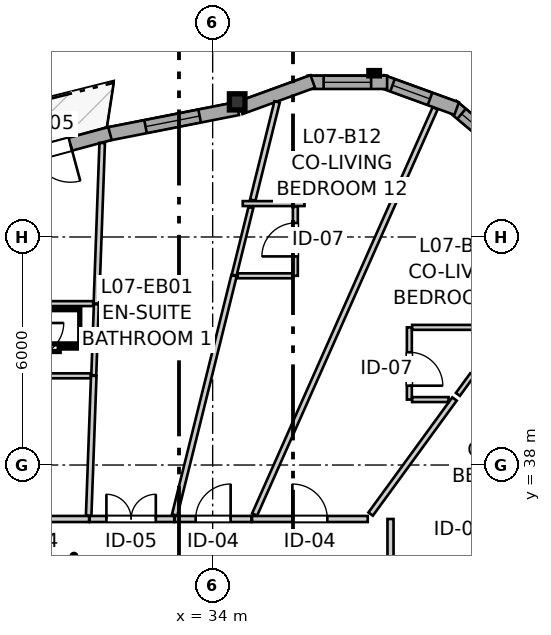
"""IFC4 building model, lengths in metres.
Left out: names, types, materials, properties, quantities, classifications, styles, units other than length and angle.
Written with IfcOpenShell. Run it as: python <this file> out.ifc"""

import sys

from ifc_helpers import new_model, si_unit, direction, frame, frame_2d, origin, origin_2d, place, context, subcontext, project, spatial, rectangle, i_section, extrude, source, transform, mapped, element, fill, save


model = new_model("IFC4")
c1 = context("Model", 3, precision=1e-05, world=origin(), true_north=direction((0.0, 1.0)))
c2 = subcontext(c1, "Body", "Model", "MODEL_VIEW")
j1 = project(units=[si_unit("LENGTHUNIT", "METRE"), si_unit("PLANEANGLEUNIT", "RADIAN")], contexts=[c1])
p1 = place(None, origin())
s1 = spatial("IfcSite", under=j1, at=p1, CompositionType="ELEMENT")
p2 = place(p1, origin())
s2 = spatial("IfcBuilding", under=s1, at=p2, CompositionType="ELEMENT")
p3 = place(p2, frame((0.0, 0.0, 27.0)))
s3 = spatial("IfcBuildingStorey", under=s2, at=p3, CompositionType="ELEMENT", Elevation=27.0)
m1 = source(origin(), c2, "Body", "SweptSolid", [
    extrude(i_section(OverallWidth=0.409, OverallDepth=0.425, WebThickness=0.03, FlangeThickness=0.048, FilletRadius=0.015, at=origin_2d()), origin(), (0.0, 0.0, 1.0), 2.935),
])
p4 = place(p3, frame((34.645, 47.555, 0.0), z_axis=(0.0, 0.0, 1.0), x_axis=(1.0, 0.0, 0.0)))
e1 = element("IfcColumn", 1, at=p4, inside=s3, PredefinedType="PILASTER", context=c2, shape_type="MappedRepresentation", body=[
    mapped(m1, transform((0.0, 0.0, 0.0), x_axis=(1.0, 0.0, 0.0), y_axis=(0.0, 1.0, 0.0), z_axis=(0.0, 0.0, 1.0), scale=1.0)),
])
p5 = place(p3, frame((41.905, 46.102, 0.0), z_axis=(0.0, 0.0, 1.0), x_axis=(-0.766024572719, 0.642811289563, 0.0)))
e2 = element("IfcWall", 2, at=p5, inside=s3, PredefinedType="SOLIDWALL", context=c2, shape_type="SweptSolid", body=[
    extrude(rectangle(XDim=2.09, YDim=0.35, at=frame_2d((1.045, 0.0))), origin(), (0.0, 0.0, 1.0), 2.415),
])
p6 = place(p5, frame((0.32, 0.0, 0.82)))
e3 = element("IfcOpeningElement", 3, at=p6, cuts=e2, PredefinedType="OPENING", context=c2, shape_type="SweptSolid", body=[
    extrude(rectangle(XDim=1.45, YDim=1.25, at=frame_2d((0.725, 0.625))), frame((0.0, 0.185, 0.0), z_axis=(0.0, -1.0, 0.0), x_axis=(1.0, 0.0, 0.0)), (0.0, 0.0, 1.0), 0.37),
])
p7 = place(p3, frame((40.421, 47.378, 0.0), z_axis=(0.0, 0.0, 1.0), x_axis=(-0.939711556618, 0.341968113072, 0.0)))
e4 = element("IfcWall", 4, at=p7, inside=s3, PredefinedType="SOLIDWALL", context=c2, shape_type="SweptSolid", body=[
    extrude(rectangle(XDim=2.09, YDim=0.35, at=frame_2d((1.045, 0.0))), origin(), (0.0, 0.0, 1.0), 2.415),
])
p8 = place(p7, frame((0.747, 0.0, 0.82)))
e5 = element("IfcOpeningElement", 5, at=p8, cuts=e4, PredefinedType="OPENING", context=c2, shape_type="SweptSolid", body=[
    extrude(rectangle(XDim=1.05, YDim=1.45, at=frame_2d((0.525, 0.725))), frame((0.0, 0.185, 0.0), z_axis=(0.0, -1.0, 0.0), x_axis=(1.0, 0.0, 0.0)), (0.0, 0.0, 1.0), 0.37),
])
p9 = place(p3, frame((38.59, 48.069, 0.0), z_axis=(0.0, 0.0, 1.0), x_axis=(-1.0, 0.0, 0.0)))
e6 = element("IfcWall", 6, at=p9, inside=s3, PredefinedType="SOLIDWALL", context=c2, shape_type="SweptSolid", body=[
    extrude(rectangle(XDim=2.09, YDim=0.35, at=frame_2d((1.045, 0.0))), origin(), (0.0, 0.0, 1.0), 2.415),
])
p10 = place(p9, frame((0.42, 0.0, 0.82)))
e7 = element("IfcOpeningElement", 7, at=p10, cuts=e6, PredefinedType="OPENING", context=c2, shape_type="SweptSolid", body=[
    extrude(rectangle(XDim=1.25, YDim=1.35, at=frame_2d((0.625, 0.675))), frame((0.0, 0.185, 0.0), z_axis=(0.0, -1.0, 0.0), x_axis=(1.0, 0.0, 0.0)), (0.0, 0.0, 1.0), 0.37),
])
p11 = place(p3, frame((36.633, 48.093, 0.0), z_axis=(0.0, 0.0, 1.0), x_axis=(-0.939691662178, -0.342022777067, 0.0)))
e8 = element("IfcWall", 8, at=p11, inside=s3, PredefinedType="SOLIDWALL", context=c2, shape_type="SweptSolid", body=[
    extrude(rectangle(XDim=2.032, YDim=0.35, at=frame_2d((1.016, 0.0))), origin(), (0.0, 0.0, 1.0), 2.415),
])
p12 = place(p3, frame((34.659, 47.38, 0.0), z_axis=(0.0, 0.0, 1.0), x_axis=(-0.981222284826, -0.19288034571, 0.0)))
e9 = element("IfcWall", 9, at=p12, inside=s3, PredefinedType="SOLIDWALL", context=c2, shape_type="SweptSolid", body=[
    extrude(rectangle(XDim=3.512, YDim=0.35, at=frame_2d((1.756, 0.0))), origin(), (0.0, 0.0, 1.0), 2.415),
])
p13 = place(p12, frame((1.021, 0.0, 0.82)))
e10 = element("IfcOpeningElement", 10, at=p13, cuts=e9, PredefinedType="OPENING", context=c2, shape_type="SweptSolid", body=[
    extrude(rectangle(XDim=1.45, YDim=1.25, at=frame_2d((0.725, 0.625))), frame((0.0, 0.185, 0.0), z_axis=(0.0, -1.0, 0.0), x_axis=(1.0, 0.0, 0.0)), (0.0, 0.0, 1.0), 0.37),
])
p14 = place(p3, frame((31.298, 46.722, 0.0), z_axis=(0.0, 0.0, 1.0), x_axis=(-0.965455913242, -0.260566459057, 0.0)))
e11 = element("IfcWall", 11, at=p14, inside=s3, PredefinedType="SOLIDWALL", context=c2, shape_type="SweptSolid", body=[
    extrude(rectangle(XDim=3.159, YDim=0.35, at=frame_2d((1.58, 0.0))), origin(), (0.0, 0.0, 1.0), 2.415),
])
p15 = place(p14, frame((1.08, 0.0, 0.0)))
e12 = element("IfcOpeningElement", 12, at=p15, cuts=e11, PredefinedType="OPENING", context=c2, shape_type="SweptSolid", body=[
    extrude(rectangle(XDim=1.0, YDim=2.1, at=frame_2d((0.5, 1.05))), frame((0.0, 0.185, 0.0), z_axis=(0.0, -1.0, 0.0), x_axis=(1.0, 0.0, 0.0)), (0.0, 0.0, 1.0), 0.37),
])
p16 = place(p3, frame((38.68, 36.58, 0.0), z_axis=(0.0, 0.0, 1.0), x_axis=(0.0, -1.0, 0.0)))
e13 = element("IfcWall", 13, at=p16, inside=s3, PredefinedType="PARTITIONING", context=c2, shape_type="SweptSolid", body=[
    extrude(rectangle(XDim=4.39, YDim=0.16, at=frame_2d((2.195, 0.0))), origin(), (0.0, 0.0, 1.0), 2.935),
])
p17 = place(p16, frame((1.726, 0.0, 0.0)))
e14 = element("IfcOpeningElement", 14, at=p17, cuts=e13, PredefinedType="OPENING", context=c2, shape_type="SweptSolid", body=[
    extrude(rectangle(XDim=0.92, YDim=2.1, at=frame_2d((0.46, 1.05))), frame((0.0, 0.09, 0.0), z_axis=(0.0, -1.0, 0.0), x_axis=(1.0, 0.0, 0.0)), (0.0, 0.0, 1.0), 0.18),
])
p18 = place(p3, frame((35.036, 36.58, 0.0), z_axis=(0.0, 0.0, 1.0), x_axis=(1.0, 0.0, 0.0)))
e15 = element("IfcWall", 15, at=p18, inside=s3, PredefinedType="PARTITIONING", context=c2, shape_type="SweptSolid", body=[
    extrude(rectangle(XDim=3.045, YDim=0.16, at=frame_2d((1.522, 0.0))), origin(), (0.0, 0.0, 1.0), 2.935),
])
p19 = place(p18, frame((1.062, 0.0, 0.0)))
e16 = element("IfcOpeningElement", 16, at=p19, cuts=e15, PredefinedType="OPENING", context=c2, shape_type="SweptSolid", body=[
    extrude(rectangle(XDim=0.92, YDim=2.1, at=frame_2d((0.46, 1.05))), frame((0.0, 0.09, 0.0), z_axis=(0.0, -1.0, 0.0), x_axis=(1.0, 0.0, 0.0)), (0.0, 0.0, 1.0), 0.18),
])
p20 = place(p3, frame((27.846, 36.58, 0.0), z_axis=(0.0, 0.0, 1.0), x_axis=(1.0, 0.0, 0.0)))
e17 = element("IfcWall", 17, at=p20, inside=s3, PredefinedType="PARTITIONING", context=c2, shape_type="SweptSolid", body=[
    extrude(rectangle(XDim=2.903, YDim=0.16, at=frame_2d((1.452, 0.0))), origin(), (0.0, 0.0, 1.0), 2.935),
])
p21 = place(p20, frame((0.969, 0.0, 0.0)))
e18 = element("IfcOpeningElement", 18, at=p21, cuts=e17, PredefinedType="OPENING", context=c2, shape_type="SweptSolid", body=[
    extrude(rectangle(XDim=0.92, YDim=2.1, at=frame_2d((0.46, 1.05))), frame((0.0, 0.09, 0.0), z_axis=(0.0, -1.0, 0.0), x_axis=(1.0, 0.0, 0.0)), (0.0, 0.0, 1.0), 0.18),
])
p22 = place(p3, frame((30.764, 36.58, 0.0), z_axis=(0.0, 0.0, 1.0), x_axis=(1.0, 0.0, 0.0)))
e19 = element("IfcWall", 19, at=p22, inside=s3, PredefinedType="PARTITIONING", context=c2, shape_type="SweptSolid", body=[
    extrude(rectangle(XDim=2.225, YDim=0.16, at=frame_2d((1.113, 0.0))), origin(), (0.0, 0.0, 1.0), 2.935),
])
p23 = place(p22, frame((0.44, 0.0, 0.0)))
e20 = element("IfcOpeningElement", 20, at=p23, cuts=e19, PredefinedType="OPENING", context=c2, shape_type="SweptSolid", body=[
    extrude(rectangle(XDim=1.3, YDim=2.1, at=frame_2d((0.65, 1.05))), frame((0.0, 0.09, 0.0), z_axis=(0.0, -1.0, 0.0), x_axis=(1.0, 0.0, 0.0)), (0.0, 0.0, 1.0), 0.18),
])
p24 = place(p3, frame((33.004, 36.58, 0.0), z_axis=(0.0, 0.0, 1.0), x_axis=(1.0, 0.0, 0.0)))
e21 = element("IfcWall", 21, at=p24, inside=s3, PredefinedType="PARTITIONING", context=c2, shape_type="SweptSolid", body=[
    extrude(rectangle(XDim=2.017, YDim=0.16, at=frame_2d((1.009, 0.0))), origin(), (0.0, 0.0, 1.0), 2.935),
])
p25 = place(p24, frame((0.549, 0.0, 0.0)))
e22 = element("IfcOpeningElement", 22, at=p25, cuts=e21, PredefinedType="OPENING", context=c2, shape_type="SweptSolid", body=[
    extrude(rectangle(XDim=0.92, YDim=2.1, at=frame_2d((0.46, 1.05))), frame((0.0, 0.09, 0.0), z_axis=(0.0, -1.0, 0.0), x_axis=(1.0, 0.0, 0.0)), (0.0, 0.0, 1.0), 0.18),
])
p26 = place(p3, frame((39.176, 41.622, 0.0), z_axis=(0.0, 0.0, 1.0), x_axis=(0.0, -1.0, 0.0)))
e23 = element("IfcWall", 23, at=p26, inside=s3, PredefinedType="PARTITIONING", context=c2, shape_type="SweptSolid", body=[
    extrude(rectangle(XDim=1.9, YDim=0.13, at=frame_2d((0.95, 0.0))), origin(), (0.0, 0.0, 1.0), 2.935),
])
p27 = place(p26, frame((0.655, 0.0, 0.0)))
e24 = element("IfcOpeningElement", 24, at=p27, cuts=e23, PredefinedType="OPENING", context=c2, shape_type="SweptSolid", body=[
    extrude(rectangle(XDim=0.88, YDim=2.05, at=frame_2d((0.44, 1.025))), frame((0.0, 0.075, 0.0), z_axis=(0.0, -1.0, 0.0), x_axis=(1.0, 0.0, 0.0)), (0.0, 0.0, 1.0), 0.15),
])
p28 = place(p3, frame((36.176, 42.979, 0.0), z_axis=(0.0, 0.0, 1.0), x_axis=(0.0, 1.0, 0.0)))
e25 = element("IfcWall", 25, at=p28, inside=s3, PredefinedType="PARTITIONING", context=c2, shape_type="SweptSolid", body=[
    extrude(rectangle(XDim=1.827, YDim=0.13, at=frame_2d((0.914, 0.0))), origin(), (0.0, 0.0, 1.0), 2.935),
])
p29 = place(p28, frame((0.51, 0.0, 0.0)))
e26 = element("IfcOpeningElement", 26, at=p29, cuts=e25, PredefinedType="OPENING", context=c2, shape_type="SweptSolid", body=[
    extrude(rectangle(XDim=0.88, YDim=2.05, at=frame_2d((0.44, 1.025))), frame((0.0, 0.075, 0.0), z_axis=(0.0, -1.0, 0.0), x_axis=(1.0, 0.0, 0.0)), (0.0, 0.0, 1.0), 0.15),
])
p30 = place(p3, frame((35.104, 36.697, 0.0), z_axis=(0.0, 0.0, 1.0), x_axis=(0.406121034368, 0.913819295837, 0.0)))
e27 = element("IfcWall", 27, at=p30, inside=s3, PredefinedType="PARTITIONING", context=c2, shape_type="SweptSolid", body=[
    extrude(rectangle(XDim=11.695, YDim=0.145, at=frame_2d((5.848, 0.0))), origin(), (0.0, 0.0, 1.0), 2.935),
])
p31 = place(p3, frame((38.81, 32.306, 0.0), z_axis=(0.0, 0.0, 1.0), x_axis=(0.801799720797, 0.597592844443, 0.0)))
e28 = element("IfcWall", 28, at=p31, inside=s3, PredefinedType="PARTITIONING", context=c2, shape_type="SweptSolid", body=[
    extrude(rectangle(XDim=7.424, YDim=0.145, at=frame_2d((3.712, 0.0))), origin(), (0.0, 0.0, 1.0), 2.935),
])
p32 = place(p3, frame((33.0, 36.685, 0.0), z_axis=(0.0, 0.0, 1.0), x_axis=(0.240736846637, 0.970590423748, 0.0)))
e29 = element("IfcWall", 29, at=p32, inside=s3, PredefinedType="PARTITIONING", context=c2, shape_type="SweptSolid", body=[
    extrude(rectangle(XDim=6.484, YDim=0.145, at=frame_2d((3.242, 0.0))), origin(), (0.0, 0.0, 1.0), 2.935),
])
p33 = place(p3, frame((30.94, 42.247, 0.0), z_axis=(0.0, 0.0, 1.0), x_axis=(0.03624948077, 0.999342771597, 0.0)))
e30 = element("IfcWall", 30, at=p33, inside=s3, PredefinedType="PARTITIONING", context=c2, shape_type="SweptSolid", body=[
    extrude(rectangle(XDim=4.229, YDim=0.145, at=frame_2d((2.115, 0.0))), origin(), (0.0, 0.0, 1.0), 2.935),
])
p34 = place(p3, frame((38.157, 36.709, 0.0), z_axis=(0.0, 0.0, 1.0), x_axis=(0.589039209188, 0.808104454906, 0.0)))
e31 = element("IfcWall", 31, at=p34, inside=s3, PredefinedType="PARTITIONING", context=c2, shape_type="SweptSolid", body=[
    extrude(rectangle(XDim=3.747, YDim=0.145, at=frame_2d((1.874, 0.0))), origin(), (0.0, 0.0, 1.0), 2.935),
])
p35 = place(p3, frame((30.737, 36.671, 0.0), z_axis=(0.0, 0.0, 1.0), x_axis=(0.036368539535, 0.999338445839, 0.0)))
e32 = element("IfcWall", 32, at=p35, inside=s3, PredefinedType="PARTITIONING", context=c2, shape_type="SweptSolid", body=[
    extrude(rectangle(XDim=3.679, YDim=0.145, at=frame_2d((1.839, 0.0))), origin(), (0.0, 0.0, 1.0), 2.935),
])
p36 = place(p3, frame((35.054, 44.969, 0.0), z_axis=(0.0, 0.0, 1.0), x_axis=(0.240615617293, 0.970620484388, 0.0)))
e33 = element("IfcWall", 33, at=p36, inside=s3, PredefinedType="PARTITIONING", context=c2, shape_type="SweptSolid", body=[
    extrude(rectangle(XDim=2.664, YDim=0.145, at=frame_2d((1.332, 0.0))), origin(), (0.0, 0.0, 1.0), 2.935),
])
p37 = place(p3, frame((34.565, 42.994, 0.0), z_axis=(0.0, 0.0, 1.0), x_axis=(0.240658084914, 0.970609955732, 0.0)))
e34 = element("IfcWall", 34, at=p37, inside=s3, PredefinedType="PARTITIONING", context=c2, shape_type="SweptSolid", body=[
    extrude(rectangle(XDim=1.836, YDim=0.13, at=frame_2d((0.918, 0.0))), origin(), (0.0, 0.0, 1.0), 2.935),
])
p38 = place(p3, frame((30.872, 40.362, 0.0), z_axis=(0.0, 0.0, 1.0), x_axis=(0.036273279858, 0.999341908042, 0.0)))
e35 = element("IfcWall", 35, at=p38, inside=s3, PredefinedType="PARTITIONING", context=c2, shape_type="SweptSolid", body=[
    extrude(rectangle(XDim=1.871, YDim=0.13, at=frame_2d((0.936, 0.0))), origin(), (0.0, 0.0, 1.0), 2.935),
])
p39 = place(p3, frame((39.249, 41.622, 0.0), z_axis=(0.0, 0.0, 1.0), x_axis=(1.0, 0.0, 0.0)))
e36 = element("IfcWall", 36, at=p39, inside=s3, PredefinedType="PARTITIONING", context=c2, shape_type="SweptSolid", body=[
    extrude(rectangle(XDim=1.727, YDim=0.13, at=frame_2d((0.864, 0.0))), origin(), (0.0, 0.0, 1.0), 2.935),
])
p40 = place(p3, frame((29.274, 42.247, 0.0), z_axis=(0.0, 0.0, 1.0), x_axis=(1.0, 0.0, 0.0)))
e37 = element("IfcWall", 37, at=p40, inside=s3, PredefinedType="PARTITIONING", context=c2, shape_type="SweptSolid", body=[
    extrude(rectangle(XDim=1.583, YDim=0.13, at=frame_2d((0.792, 0.0))), origin(), (0.0, 0.0, 1.0), 2.503),
])
p41 = place(p3, frame((29.274, 40.347, 0.0), z_axis=(0.0, 0.0, 1.0), x_axis=(1.0, 0.0, 0.0)))
e38 = element("IfcWall", 38, at=p41, inside=s3, PredefinedType="PARTITIONING", context=c2, shape_type="SweptSolid", body=[
    extrude(rectangle(XDim=1.514, YDim=0.13, at=frame_2d((0.757, 0.0))), origin(), (0.0, 0.0, 1.0), 2.935),
])
p42 = place(p3, frame((34.66, 42.979, 0.0), z_axis=(0.0, 0.0, 1.0), x_axis=(1.0, 0.0, 0.0)))
e39 = element("IfcWall", 39, at=p42, inside=s3, PredefinedType="PARTITIONING", context=c2, shape_type="SweptSolid", body=[
    extrude(rectangle(XDim=1.443, YDim=0.13, at=frame_2d((0.722, 0.0))), origin(), (0.0, 0.0, 1.0), 2.935),
])
p43 = place(p3, frame((39.249, 39.722, 0.0), z_axis=(0.0, 0.0, 1.0), x_axis=(1.0, 0.0, 0.0)))
e40 = element("IfcWall", 40, at=p43, inside=s3, PredefinedType="PARTITIONING", context=c2, shape_type="SweptSolid", body=[
    extrude(rectangle(XDim=0.959, YDim=0.13, at=frame_2d((0.479, 0.0))), origin(), (0.0, 0.0, 1.0), 2.935),
])
p44 = place(p3, frame((34.792, 44.879, 0.0), z_axis=(0.0, 0.0, 1.0), x_axis=(1.0, 0.0, 0.0)))
e41 = element("IfcWall", 41, at=p44, inside=s3, PredefinedType="PARTITIONING", context=c2, shape_type="SweptSolid", body=[
    extrude(rectangle(XDim=1.624, YDim=0.13, at=frame_2d((0.812, 0.0))), origin(), (0.0, 0.0, 1.0), 2.935),
])
p45 = place(p3, frame((40.453, 39.858, 0.0), z_axis=(0.0, 0.0, 1.0), x_axis=(0.589192932261, 0.807992381507, 0.0)))
e42 = element("IfcWall", 42, at=p45, inside=s3, PredefinedType="PARTITIONING", context=c2, shape_type="SweptSolid", body=[
    extrude(rectangle(XDim=0.639, YDim=0.13, at=frame_2d((0.32, 0.0))), origin(), (0.0, 0.0, 1.0), 2.935),
])
m2 = source(origin(), c2, "Body", "SweptSolid", [
    extrude(rectangle(XDim=1.45, YDim=1.25, at=frame_2d((0.725, 0.625))), frame((0.0, 0.03, 0.0), z_axis=(0.0, -1.0, 0.0), x_axis=(1.0, 0.0, 0.0)), (0.0, 0.0, 1.0), 0.06),
])
p46 = place(p6, origin())
e43 = element("IfcWindow", 43, at=p46, inside=s3, PartitioningType="SINGLE_PANEL", PredefinedType="WINDOW", context=c2, shape_type="MappedRepresentation", body=[
    mapped(m2, transform((0.0, 0.0, 0.0), x_axis=(1.0, 0.0, 0.0), y_axis=(0.0, 1.0, 0.0), z_axis=(0.0, 0.0, 1.0), scale=1.0)),
])
fill(e3, e43)
m3 = source(origin(), c2, "Body", "SweptSolid", [
    extrude(rectangle(XDim=1.05, YDim=1.45, at=frame_2d((0.525, 0.725))), frame((0.0, 0.03, 0.0), z_axis=(0.0, -1.0, 0.0), x_axis=(1.0, 0.0, 0.0)), (0.0, 0.0, 1.0), 0.06),
])
p47 = place(p8, origin())
e44 = element("IfcWindow", 44, at=p47, inside=s3, PartitioningType="SINGLE_PANEL", PredefinedType="WINDOW", context=c2, shape_type="MappedRepresentation", body=[
    mapped(m3, transform((0.0, 0.0, 0.0), x_axis=(1.0, 0.0, 0.0), y_axis=(0.0, 1.0, 0.0), z_axis=(0.0, 0.0, 1.0), scale=1.0)),
])
fill(e5, e44)
m4 = source(origin(), c2, "Body", "SweptSolid", [
    extrude(rectangle(XDim=1.25, YDim=1.35, at=frame_2d((0.625, 0.675))), frame((0.0, 0.03, 0.0), z_axis=(0.0, -1.0, 0.0), x_axis=(1.0, 0.0, 0.0)), (0.0, 0.0, 1.0), 0.06),
])
p48 = place(p10, origin())
e45 = element("IfcWindow", 45, at=p48, inside=s3, PartitioningType="SINGLE_PANEL", PredefinedType="WINDOW", context=c2, shape_type="MappedRepresentation", body=[
    mapped(m4, transform((0.0, 0.0, 0.0), x_axis=(1.0, 0.0, 0.0), y_axis=(0.0, 1.0, 0.0), z_axis=(0.0, 0.0, 1.0), scale=1.0)),
])
fill(e7, e45)
p49 = place(p13, origin())
e46 = element("IfcWindow", 46, at=p49, inside=s3, PartitioningType="SINGLE_PANEL", PredefinedType="WINDOW", context=c2, shape_type="MappedRepresentation", body=[
    mapped(m2, transform((0.0, 0.0, 0.0), x_axis=(1.0, 0.0, 0.0), y_axis=(0.0, 1.0, 0.0), z_axis=(0.0, 0.0, 1.0), scale=1.0)),
])
fill(e10, e46)
m5 = source(origin(), c2, "Body", "SweptSolid", [
    extrude(rectangle(XDim=1.0, YDim=2.1, at=frame_2d((0.5, 1.05))), frame((0.0, 0.025, 0.0), z_axis=(0.0, -1.0, 0.0), x_axis=(1.0, 0.0, 0.0)), (0.0, 0.0, 1.0), 0.05),
])
p50 = place(p15, origin())
e47 = element("IfcDoor", 47, at=p50, inside=s3, OperationType="SINGLE_SWING_LEFT", PredefinedType="DOOR", context=c2, shape_type="MappedRepresentation", body=[
    mapped(m5, transform((0.0, 0.0, 0.0), x_axis=(1.0, 0.0, 0.0), y_axis=(0.0, 1.0, 0.0), z_axis=(0.0, 0.0, 1.0), scale=1.0)),
])
fill(e12, e47)
m6 = source(origin(), c2, "Body", "SweptSolid", [
    extrude(rectangle(XDim=0.92, YDim=2.1, at=frame_2d((0.46, 1.05))), frame((0.0, 0.025, 0.0), z_axis=(0.0, -1.0, 0.0), x_axis=(1.0, 0.0, 0.0)), (0.0, 0.0, 1.0), 0.05),
])
p51 = place(p19, origin())
e48 = element("IfcDoor", 48, at=p51, inside=s3, OperationType="SINGLE_SWING_LEFT", PredefinedType="DOOR", context=c2, shape_type="MappedRepresentation", body=[
    mapped(m6, transform((0.0, 0.0, 0.0), x_axis=(1.0, 0.0, 0.0), y_axis=(0.0, 1.0, 0.0), z_axis=(0.0, 0.0, 1.0), scale=1.0)),
])
fill(e16, e48)
m7 = source(origin(), c2, "Body", "SweptSolid", [
    extrude(rectangle(XDim=1.3, YDim=2.1, at=frame_2d((0.65, 1.05))), frame((0.0, 0.025, 0.0), z_axis=(0.0, -1.0, 0.0), x_axis=(1.0, 0.0, 0.0)), (0.0, 0.0, 1.0), 0.05),
])
p52 = place(p23, origin())
e49 = element("IfcDoor", 49, at=p52, inside=s3, OperationType="DOUBLE_DOOR_SINGLE_SWING", PredefinedType="DOOR", context=c2, shape_type="MappedRepresentation", body=[
    mapped(m7, transform((0.0, 0.0, 0.0), x_axis=(1.0, 0.0, 0.0), y_axis=(0.0, 1.0, 0.0), z_axis=(0.0, 0.0, 1.0), scale=1.0)),
])
fill(e20, e49)
p53 = place(p25, origin())
e50 = element("IfcDoor", 50, at=p53, inside=s3, OperationType="SINGLE_SWING_RIGHT", PredefinedType="DOOR", context=c2, shape_type="MappedRepresentation", body=[
    mapped(m6, transform((0.0, 0.0, 0.0), x_axis=(1.0, 0.0, 0.0), y_axis=(0.0, 1.0, 0.0), z_axis=(0.0, 0.0, 1.0), scale=1.0)),
])
fill(e22, e50)
m8 = source(origin(), c2, "Body", "SweptSolid", [
    extrude(rectangle(XDim=0.88, YDim=2.05, at=frame_2d((0.44, 1.025))), frame((0.0, 0.025, 0.0), z_axis=(0.0, -1.0, 0.0), x_axis=(1.0, 0.0, 0.0)), (0.0, 0.0, 1.0), 0.05),
])
p54 = place(p27, origin())
e51 = element("IfcDoor", 51, at=p54, inside=s3, OperationType="SINGLE_SWING_RIGHT", PredefinedType="DOOR", context=c2, shape_type="MappedRepresentation", body=[
    mapped(m8, transform((0.0, 0.0, 0.0), x_axis=(1.0, 0.0, 0.0), y_axis=(0.0, 1.0, 0.0), z_axis=(0.0, 0.0, 1.0), scale=1.0)),
])
fill(e24, e51)
p55 = place(p29, origin())
e52 = element("IfcDoor", 52, at=p55, inside=s3, OperationType="SINGLE_SWING_LEFT", PredefinedType="DOOR", context=c2, shape_type="MappedRepresentation", body=[
    mapped(m8, transform((0.0, 0.0, 0.0), x_axis=(1.0, 0.0, 0.0), y_axis=(0.0, 1.0, 0.0), z_axis=(0.0, 0.0, 1.0), scale=1.0)),
])
fill(e26, e52)
save(model, sys.argv[1])
